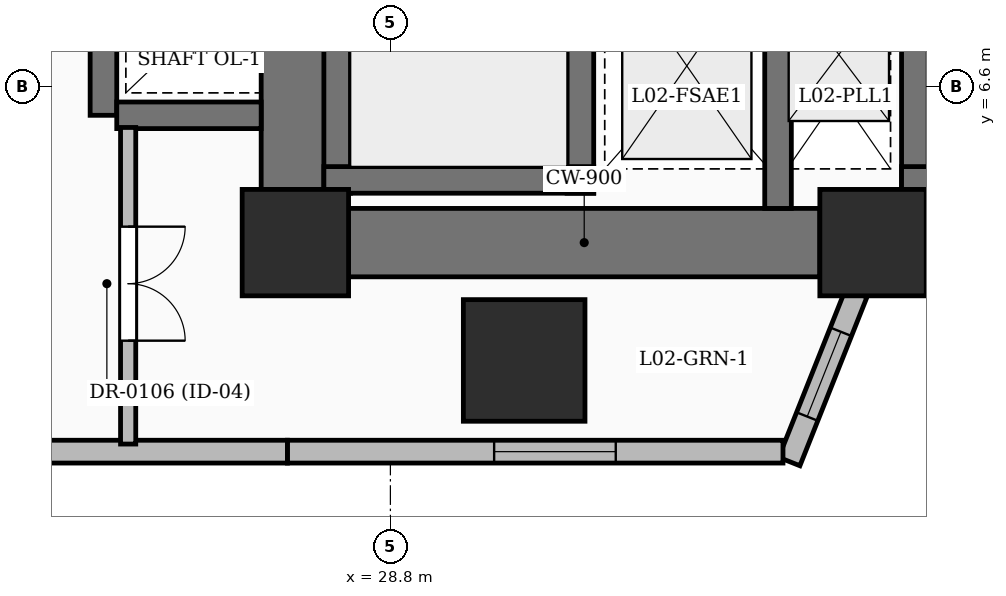
"""IFC4 building model, lengths in metres.
Left out: names, types, materials, properties, quantities, classifications, styles, units other than length and angle.
Written with IfcOpenShell. Run it as: python <this file> out.ifc"""

import sys

from ifc_helpers import new_model, si_unit, direction, frame, frame_2d, origin, origin_2d, place, context, subcontext, project, spatial, rectangle, extrude, element, fill, save


model = new_model("IFC4")
c1 = context("Model", 3, precision=1e-05, world=origin(), true_north=direction((0.0, 1.0)))
c2 = subcontext(c1, "Body", "Model", "MODEL_VIEW")
j1 = project(units=[si_unit("LENGTHUNIT", "METRE"), si_unit("PLANEANGLEUNIT", "RADIAN")], contexts=[c1])
p1 = place(None, origin())
s1 = spatial("IfcSite", under=j1, at=p1, CompositionType="ELEMENT")
p2 = place(p1, origin())
s2 = spatial("IfcBuilding", under=s1, at=p2, CompositionType="ELEMENT")
p3 = place(p2, frame((0.0, 0.0, 12.9)))
s3 = spatial("IfcBuildingStorey", under=s2, at=p3, CompositionType="ELEMENT", Elevation=12.9)
for number, where, z_axis, x_axis in (
    (1, (27.55, 4.55, 0.0), (0.0, 0.0, 1.0), (1.0, 0.0, 0.0)),
    (2, (35.15, 4.55, 0.0), (0.0, 0.0, 1.0), (1.0, 0.0, 0.0)),
):
    element("IfcColumn", number, at=place(p3, frame(where, z_axis=z_axis, x_axis=x_axis)), inside=s3, PredefinedType="COLUMN", context=c2, shape_type="SweptSolid", body=[
        extrude(rectangle(XDim=1.4, YDim=1.4, at=origin_2d()), origin(), (0.0, 0.0, 1.0), 4.5),
    ])
p4 = place(p3, frame((28.25, 4.55, 0.0), z_axis=(0.0, 0.0, 1.0), x_axis=(1.0, 0.0, 0.0)))
e3 = element("IfcWall", 3, at=p4, inside=s3, PredefinedType="SHEAR", context=c2, shape_type="SweptSolid", body=[
    extrude(rectangle(XDim=6.2, YDim=0.9, at=frame_2d((3.1, 0.0))), origin(), (0.0, 0.0, 1.0), 4.5),
])
p5 = place(p3, frame((27.55, 5.25, 0.0), z_axis=(0.0, 0.0, 1.0), x_axis=(0.0, 1.0, 0.0)))
e4 = element("IfcWall", 4, at=p5, inside=s3, PredefinedType="SHEAR", context=c2, shape_type="SweptSolid", body=[
    extrude(rectangle(XDim=8.8, YDim=0.9, at=frame_2d((4.4, 0.0))), origin(), (0.0, 0.0, 1.0), 4.5),
])
p6 = place(p3, frame((28.1, 5.2, 0.0), z_axis=(0.0, 0.0, 1.0), x_axis=(0.0, 1.0, 0.0)))
e5 = element("IfcWall", 5, at=p6, inside=s3, PredefinedType="SOLIDWALL", context=c2, shape_type="SweptSolid", body=[
    extrude(rectangle(XDim=9.1, YDim=0.35, at=frame_2d((4.55, 0.0))), origin(), (0.0, 0.0, 1.0), 4.5),
])
p7 = place(p3, frame((31.3, 5.2, 0.0), z_axis=(0.0, 0.0, 1.0), x_axis=(0.0, 1.0, 0.0)))
e6 = element("IfcWall", 6, at=p7, inside=s3, PredefinedType="SOLIDWALL", context=c2, shape_type="SweptSolid", body=[
    extrude(rectangle(XDim=9.1, YDim=0.35, at=frame_2d((4.55, 0.0))), origin(), (0.0, 0.0, 1.0), 4.5),
])
p8 = place(p7, frame((6.02, 0.0, 0.0)))
e7 = element("IfcOpeningElement", 7, at=p8, cuts=e6, PredefinedType="OPENING", context=c2, shape_type="SweptSolid", body=[
    extrude(rectangle(XDim=1.0, YDim=2.15, at=frame_2d((0.5, 1.075))), frame((0.0, 0.185, 0.0), z_axis=(0.0, -1.0, 0.0), x_axis=(1.0, 0.0, 0.0)), (0.0, 0.0, 1.0), 0.37),
])
p9 = place(p3, frame((27.925, 5.375, 0.0), z_axis=(0.0, 0.0, 1.0), x_axis=(1.0, 0.0, 0.0)))
e8 = element("IfcWall", 8, at=p9, inside=s3, PredefinedType="SOLIDWALL", context=c2, shape_type="SweptSolid", body=[
    extrude(rectangle(XDim=3.55, YDim=0.35, at=frame_2d((1.775, 0.0))), origin(), (0.0, 0.0, 1.0), 4.5),
])
p10 = place(p3, frame((35.7, 5.2, 0.0), z_axis=(0.0, 0.0, 1.0), x_axis=(0.0, 1.0, 0.0)))
e9 = element("IfcWall", 9, at=p10, inside=s3, PredefinedType="SOLIDWALL", context=c2, shape_type="SweptSolid", body=[
    extrude(rectangle(XDim=9.1, YDim=0.35, at=frame_2d((4.55, 0.0))), origin(), (0.0, 0.0, 1.0), 4.5),
])
p11 = place(p10, frame((6.02, 0.0, 0.0)))
e10 = element("IfcOpeningElement", 10, at=p11, cuts=e9, PredefinedType="OPENING", context=c2, shape_type="SweptSolid", body=[
    extrude(rectangle(XDim=1.0, YDim=2.15, at=frame_2d((0.5, 1.075))), frame((0.0, 0.185, 0.0), z_axis=(0.0, -1.0, 0.0), x_axis=(1.0, 0.0, 0.0)), (0.0, 0.0, 1.0), 0.37),
])
p12 = place(p3, frame((35.525, 5.375, 0.0), z_axis=(0.0, 0.0, 1.0), x_axis=(1.0, 0.0, 0.0)))
e11 = element("IfcWall", 11, at=p12, inside=s3, PredefinedType="SOLIDWALL", context=c2, shape_type="SweptSolid", body=[
    extrude(rectangle(XDim=3.55, YDim=0.35, at=frame_2d((1.775, 0.0))), origin(), (0.0, 0.0, 1.0), 4.5),
])
p13 = place(p3, frame((33.9, 5.0, 0.0), z_axis=(0.0, 0.0, 1.0), x_axis=(0.0, 1.0, 0.0)))
e12 = element("IfcWall", 12, at=p13, inside=s3, PredefinedType="SOLIDWALL", context=c2, shape_type="SweptSolid", body=[
    extrude(rectangle(XDim=2.925, YDim=0.35, at=frame_2d((1.462, 0.0))), origin(), (0.0, 0.0, 1.0), 4.5),
])
p14 = place(p3, frame((25.025, 6.225, 0.0), z_axis=(0.0, 0.0, 1.0), x_axis=(0.0, 1.0, 0.0)))
e13 = element("IfcWall", 13, at=p14, inside=s3, PredefinedType="SOLIDWALL", context=c2, shape_type="SweptSolid", body=[
    extrude(rectangle(XDim=4.95, YDim=0.35, at=frame_2d((2.475, 0.0))), origin(), (0.0, 0.0, 1.0), 4.5),
])
p15 = place(p3, frame((25.2, 6.225, 0.0), z_axis=(0.0, 0.0, 1.0), x_axis=(1.0, 0.0, 0.0)))
e14 = element("IfcWall", 14, at=p15, inside=s3, PredefinedType="SOLIDWALL", context=c2, shape_type="SweptSolid", body=[
    extrude(rectangle(XDim=1.9, YDim=0.35, at=frame_2d((0.95, 0.0))), origin(), (0.0, 0.0, 1.0), 4.5),
])
p16 = place(p3, frame((30.56, 3.0, 0.0), z_axis=(0.0, 0.0, 1.0), x_axis=(1.0, 0.0, 0.0)))
e15 = element("IfcColumn", 15, at=p16, inside=s3, PredefinedType="COLUMN", context=c2, shape_type="SweptSolid", body=[
    extrude(rectangle(XDim=1.6, YDim=1.6, at=origin_2d()), origin(), (0.0, 0.0, 1.0), 4.5),
])
p17 = place(p3, frame((34.93, 3.888, 0.0), z_axis=(0.0, 0.0, 1.0), x_axis=(-0.369538313764, -0.9292154942, 0.0)))
e16 = element("IfcWall", 16, at=p17, inside=s3, PredefinedType="SOLIDWALL", context=c2, shape_type="SweptSolid", body=[
    extrude(rectangle(XDim=2.387, YDim=0.3, at=frame_2d((1.193, 0.0))), origin(), (0.0, 0.0, 1.0), 2.975),
])
p18 = place(p17, frame((0.55, 0.0, 0.8)))
e17 = element("IfcOpeningElement", 17, at=p18, cuts=e16, PredefinedType="OPENING", context=c2, shape_type="SweptSolid", body=[
    extrude(rectangle(XDim=1.2, YDim=1.8, at=frame_2d((0.6, 0.9))), frame((0.0, 0.16, 0.0), z_axis=(0.0, -1.0, 0.0), x_axis=(1.0, 0.0, 0.0)), (0.0, 0.0, 1.0), 0.32),
])
p19 = place(p3, frame((33.965, 1.8, 0.0), z_axis=(0.0, 0.0, 1.0), x_axis=(-1.0, 0.0, 0.0)))
e18 = element("IfcWall", 18, at=p19, inside=s3, PredefinedType="SOLIDWALL", context=c2, shape_type="SweptSolid", body=[
    extrude(rectangle(XDim=6.52, YDim=0.3, at=frame_2d((3.26, 0.0))), origin(), (0.0, 0.0, 1.0), 4.2),
])
p20 = place(p19, frame((2.2, 0.0, 0.55)))
e19 = element("IfcOpeningElement", 19, at=p20, cuts=e18, PredefinedType="OPENING", context=c2, shape_type="SweptSolid", body=[
    extrude(rectangle(XDim=1.6, YDim=2.2, at=frame_2d((0.8, 1.1))), frame((0.0, 0.16, 0.0), z_axis=(0.0, -1.0, 0.0), x_axis=(1.0, 0.0, 0.0)), (0.0, 0.0, 1.0), 0.32),
])
p21 = place(p3, frame((27.445, 1.8, 0.0), z_axis=(0.0, 0.0, 1.0), x_axis=(-1.0, 0.0, 0.0)))
e20 = element("IfcWall", 20, at=p21, inside=s3, PredefinedType="SOLIDWALL", context=c2, shape_type="SweptSolid", body=[
    extrude(rectangle(XDim=6.795, YDim=0.3, at=frame_2d((3.397, 0.0))), origin(), (0.0, 0.0, 1.0), 4.2),
])
p22 = place(p21, frame((3.275, 0.0, 0.6)))
e21 = element("IfcOpeningElement", 21, at=p22, cuts=e20, PredefinedType="OPENING", context=c2, shape_type="SweptSolid", body=[
    extrude(rectangle(XDim=1.5, YDim=2.1, at=frame_2d((0.75, 1.05))), frame((0.0, 0.16, 0.0), z_axis=(0.0, -1.0, 0.0), x_axis=(1.0, 0.0, 0.0)), (0.0, 0.0, 1.0), 0.32),
])
p23 = place(p3, frame((25.35, 6.065, 0.0), z_axis=(0.0, 0.0, 1.0), x_axis=(0.0, -1.0, 0.0)))
e22 = element("IfcWall", 22, at=p23, inside=s3, PredefinedType="PARTITIONING", context=c2, shape_type="SweptSolid", body=[
    extrude(rectangle(XDim=4.165, YDim=0.2, at=frame_2d((2.083, 0.0))), origin(), (0.0, 0.0, 1.0), 2.97),
])
p24 = place(p23, frame((1.305, 0.0, 0.0)))
e23 = element("IfcOpeningElement", 23, at=p24, cuts=e22, PredefinedType="OPENING", context=c2, shape_type="SweptSolid", body=[
    extrude(rectangle(XDim=1.5, YDim=2.2, at=frame_2d((0.75, 1.1))), frame((0.0, 0.11, 0.0), z_axis=(0.0, -1.0, 0.0), x_axis=(1.0, 0.0, 0.0)), (0.0, 0.0, 1.0), 0.22),
])
p25 = place(p18, origin())
e24 = element("IfcWindow", 24, at=p25, inside=s3, PartitioningType="SINGLE_PANEL", PredefinedType="WINDOW", context=c2, shape_type="SweptSolid", body=[
    extrude(rectangle(XDim=1.2, YDim=1.8, at=frame_2d((0.6, 0.9))), frame((0.0, 0.03, 0.0), z_axis=(0.0, -1.0, 0.0), x_axis=(1.0, 0.0, 0.0)), (0.0, 0.0, 1.0), 0.06),
])
fill(e17, e24)
p26 = place(p20, origin())
e25 = element("IfcWindow", 25, at=p26, inside=s3, PartitioningType="SINGLE_PANEL", PredefinedType="WINDOW", context=c2, shape_type="SweptSolid", body=[
    extrude(rectangle(XDim=1.6, YDim=2.2, at=frame_2d((0.8, 1.1))), frame((0.0, 0.03, 0.0), z_axis=(0.0, -1.0, 0.0), x_axis=(1.0, 0.0, 0.0)), (0.0, 0.0, 1.0), 0.06),
])
fill(e19, e25)
p27 = place(p24, origin())
e26 = element("IfcDoor", 26, at=p27, inside=s3, OperationType="DOUBLE_DOOR_SINGLE_SWING", PredefinedType="DOOR", context=c2, shape_type="SweptSolid", body=[
    extrude(rectangle(XDim=1.5, YDim=2.2, at=frame_2d((0.75, 1.1))), frame((0.0, 0.025, 0.0), z_axis=(0.0, -1.0, 0.0), x_axis=(1.0, 0.0, 0.0)), (0.0, 0.0, 1.0), 0.05),
])
fill(e23, e26)
save(model, sys.argv[1])
